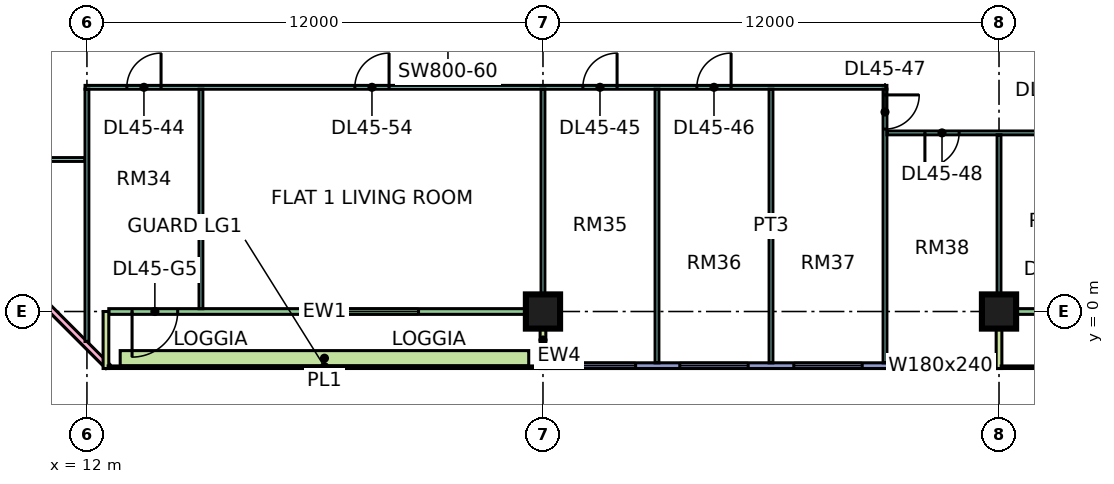
"""IFC4 building model, lengths in metres.
Left out: names, types, materials, properties, quantities, classifications, styles, units other than length and angle.
Written with IfcOpenShell. Run it as: python <this file> out.ifc"""

import sys

from ifc_helpers import new_model, si_unit, direction, frame, frame_2d, origin, origin_2d, place, context, subcontext, project, spatial, rectangle, extrude, element, fill, save


model = new_model("IFC4")
c1 = context("Model", 3, precision=1e-05, world=origin(), true_north=direction((0.0, 1.0)))
c2 = subcontext(c1, "Body", "Model", "MODEL_VIEW")
j1 = project(units=[si_unit("LENGTHUNIT", "METRE"), si_unit("PLANEANGLEUNIT", "RADIAN")], contexts=[c1])
p1 = place(None, origin())
s1 = spatial("IfcSite", under=j1, at=p1, CompositionType="ELEMENT")
p2 = place(p1, origin())
s2 = spatial("IfcBuilding", under=s1, at=p2, CompositionType="ELEMENT")
p3 = place(p2, frame((0.0, 0.0, 194.9)))
s3 = spatial("IfcBuildingStorey", under=s2, at=p3, CompositionType="ELEMENT", Elevation=194.9)
for number, where, z_axis, x_axis in (
    (1, (24.0, 0.0, 0.0), (0.0, 0.0, 1.0), (1.0, 0.0, 0.0)),
    (2, (36.0, 0.0, 0.0), (0.0, 0.0, 1.0), (1.0, 0.0, 0.0)),
):
    element("IfcColumn", number, at=place(p3, frame(where, z_axis=z_axis, x_axis=x_axis)), inside=s3, PredefinedType="COLUMN", context=c2, shape_type="SweptSolid", body=[
        extrude(rectangle(XDim=0.9, YDim=0.9, at=origin_2d()), origin(), (0.0, 0.0, 1.0), 3.75),
    ])
p4 = place(p3, frame((-1.447, 12.553, 0.0), z_axis=(0.0, 0.0, 1.0), x_axis=(0.707106781187, -0.707106781187, 0.0)))
e3 = element("IfcWall", 3, at=p4, inside=s3, PredefinedType="SOLIDWALL", context=c2, shape_type="SweptSolid", body=[
    extrude(rectangle(XDim=19.799, YDim=0.15, at=frame_2d((9.899, 0.0))), origin(), (0.0, 0.0, 1.0), 3.35),
])
p5 = place(p4, frame((2.212, 0.0, 0.45)))
e4 = element("IfcOpeningElement", 4, at=p5, cuts=e3, PredefinedType="OPENING", context=c2, shape_type="SweptSolid", body=[
    extrude(rectangle(XDim=3.0, YDim=2.4, at=frame_2d((1.5, 1.2))), frame((0.0, 0.085, 0.0), z_axis=(0.0, -1.0, 0.0), x_axis=(1.0, 0.0, 0.0)), (0.0, 0.0, 1.0), 0.17),
])
p6 = place(p4, frame((10.216, 0.0, 0.45)))
e5 = element("IfcOpeningElement", 5, at=p6, cuts=e3, PredefinedType="OPENING", context=c2, shape_type="SweptSolid", body=[
    extrude(rectangle(XDim=3.0, YDim=2.4, at=frame_2d((1.5, 1.2))), frame((0.0, 0.085, 0.0), z_axis=(0.0, -1.0, 0.0), x_axis=(1.0, 0.0, 0.0)), (0.0, 0.0, 1.0), 0.17),
])
p7 = place(p3, frame((12.575, 0.0, 0.0), z_axis=(0.0, 0.0, 1.0), x_axis=(1.0, 0.0, 0.0)))
e6 = element("IfcWall", 6, at=p7, inside=s3, PredefinedType="SOLIDWALL", context=c2, shape_type="SweptSolid", body=[
    extrude(rectangle(XDim=11.35, YDim=0.15, at=frame_2d((5.675, 0.0))), origin(), (0.0, 0.0, 1.0), 3.35),
])
p8 = place(p7, frame((0.613, 0.0, 0.0)))
e7 = element("IfcOpeningElement", 7, at=p8, cuts=e6, PredefinedType="OPENING", context=c2, shape_type="SweptSolid", body=[
    extrude(rectangle(XDim=1.2, YDim=2.4, at=frame_2d((0.6, 1.2))), frame((0.0, 0.085, 0.0), z_axis=(0.0, -1.0, 0.0), x_axis=(1.0, 0.0, 0.0)), (0.0, 0.0, 1.0), 0.17),
])
p9 = place(p7, frame((5.15, 0.0, 0.45)))
e8 = element("IfcOpeningElement", 8, at=p9, cuts=e6, PredefinedType="OPENING", context=c2, shape_type="SweptSolid", body=[
    extrude(rectangle(XDim=3.0, YDim=2.4, at=frame_2d((1.5, 1.2))), frame((0.0, 0.085, 0.0), z_axis=(0.0, -1.0, 0.0), x_axis=(1.0, 0.0, 0.0)), (0.0, 0.0, 1.0), 0.17),
])
for number, where, z_axis, x_axis in (
    (9, (12.5, -1.5, 0.0), (0.0, 0.0, 1.0), (0.0, 1.0, 0.0)),
    (10, (24.0, -1.5, 0.0), (0.0, 0.0, 1.0), (0.0, 1.0, 0.0)),
):
    element("IfcWall", number, at=place(p3, frame(where, z_axis=z_axis, x_axis=x_axis)), inside=s3, PredefinedType="SOLIDWALL", context=c2, shape_type="SweptSolid", body=[
        extrude(rectangle(XDim=1.5, YDim=0.15, at=frame_2d((0.75, 0.0))), origin(), (0.0, 0.0, 1.0), 3.35),
    ])
p10 = place(p3, frame((24.075, -1.425, 0.0), z_axis=(0.0, 0.0, 1.0), x_axis=(1.0, 0.0, 0.0)))
e11 = element("IfcWall", 11, at=p10, inside=s3, PredefinedType="SOLIDWALL", context=c2, shape_type="SweptSolid", body=[
    extrude(rectangle(XDim=11.85, YDim=0.15, at=frame_2d((5.925, 0.0))), origin(), (0.0, 0.0, 1.0), 3.35),
])
p11 = place(p10, frame((0.562, 0.0, 0.45)))
e12 = element("IfcOpeningElement", 12, at=p11, cuts=e11, PredefinedType="OPENING", context=c2, shape_type="SweptSolid", body=[
    extrude(rectangle(XDim=1.8, YDim=2.4, at=frame_2d((0.9, 1.2))), frame((0.0, 0.085, 0.0), z_axis=(0.0, -1.0, 0.0), x_axis=(1.0, 0.0, 0.0)), (0.0, 0.0, 1.0), 0.17),
])
p12 = place(p10, frame((3.525, 0.0, 0.45)))
e13 = element("IfcOpeningElement", 13, at=p12, cuts=e11, PredefinedType="OPENING", context=c2, shape_type="SweptSolid", body=[
    extrude(rectangle(XDim=1.8, YDim=2.4, at=frame_2d((0.9, 1.2))), frame((0.0, 0.085, 0.0), z_axis=(0.0, -1.0, 0.0), x_axis=(1.0, 0.0, 0.0)), (0.0, 0.0, 1.0), 0.17),
])
p13 = place(p10, frame((6.525, 0.0, 0.45)))
e14 = element("IfcOpeningElement", 14, at=p13, cuts=e11, PredefinedType="OPENING", context=c2, shape_type="SweptSolid", body=[
    extrude(rectangle(XDim=1.8, YDim=2.4, at=frame_2d((0.9, 1.2))), frame((0.0, 0.085, 0.0), z_axis=(0.0, -1.0, 0.0), x_axis=(1.0, 0.0, 0.0)), (0.0, 0.0, 1.0), 0.17),
])
p14 = place(p10, frame((9.488, 0.0, 0.45)))
e15 = element("IfcOpeningElement", 15, at=p14, cuts=e11, PredefinedType="OPENING", context=c2, shape_type="SweptSolid", body=[
    extrude(rectangle(XDim=1.8, YDim=2.4, at=frame_2d((0.9, 1.2))), frame((0.0, 0.085, 0.0), z_axis=(0.0, -1.0, 0.0), x_axis=(1.0, 0.0, 0.0)), (0.0, 0.0, 1.0), 0.17),
])
p15 = place(p3, frame((36.075, 0.0, 0.0), z_axis=(0.0, 0.0, 1.0), x_axis=(1.0, 0.0, 0.0)))
e16 = element("IfcWall", 16, at=p15, inside=s3, PredefinedType="SOLIDWALL", context=c2, shape_type="SweptSolid", body=[
    extrude(rectangle(XDim=11.85, YDim=0.15, at=frame_2d((5.925, 0.0))), origin(), (0.0, 0.0, 1.0), 3.35),
])
p16 = place(p15, frame((1.1, 0.0, 0.0)))
e17 = element("IfcOpeningElement", 17, at=p16, cuts=e16, PredefinedType="OPENING", context=c2, shape_type="SweptSolid", body=[
    extrude(rectangle(XDim=1.2, YDim=2.4, at=frame_2d((0.6, 1.2))), frame((0.0, 0.085, 0.0), z_axis=(0.0, -1.0, 0.0), x_axis=(1.0, 0.0, 0.0)), (0.0, 0.0, 1.0), 0.17),
])
p17 = place(p15, frame((4.15, 0.0, 0.45)))
e18 = element("IfcOpeningElement", 18, at=p17, cuts=e16, PredefinedType="OPENING", context=c2, shape_type="SweptSolid", body=[
    extrude(rectangle(XDim=3.0, YDim=2.4, at=frame_2d((1.5, 1.2))), frame((0.0, 0.085, 0.0), z_axis=(0.0, -1.0, 0.0), x_axis=(1.0, 0.0, 0.0)), (0.0, 0.0, 1.0), 0.17),
])
p18 = place(p15, frame((10.062, 0.0, 0.45)))
e19 = element("IfcOpeningElement", 19, at=p18, cuts=e16, PredefinedType="OPENING", context=c2, shape_type="SweptSolid", body=[
    extrude(rectangle(XDim=1.2, YDim=2.4, at=frame_2d((0.6, 1.2))), frame((0.0, 0.085, 0.0), z_axis=(0.0, -1.0, 0.0), x_axis=(1.0, 0.0, 0.0)), (0.0, 0.0, 1.0), 0.17),
])
p19 = place(p3, frame((36.0, -1.5, 0.0), z_axis=(0.0, 0.0, 1.0), x_axis=(0.0, 1.0, 0.0)))
e20 = element("IfcWall", 20, at=p19, inside=s3, PredefinedType="SOLIDWALL", context=c2, shape_type="SweptSolid", body=[
    extrude(rectangle(XDim=1.5, YDim=0.15, at=frame_2d((0.75, 0.0))), origin(), (0.0, 0.0, 1.0), 3.35),
])
p20 = place(p3, frame((12.875, -1.229, 0.0), z_axis=(0.0, 0.0, 1.0), x_axis=(1.0, 0.0, 0.0)))
e21 = element("IfcWall", 21, at=p20, inside=s3, PredefinedType="SOLIDWALL", context=c2, shape_type="SweptSolid", body=[
    extrude(rectangle(XDim=10.75, YDim=0.4, at=frame_2d((5.375, 0.0))), origin(), (0.0, 0.0, 1.0), 0.7),
])
p21 = place(p3, frame((9.05, 4.0, 0.0), z_axis=(0.0, 0.0, 1.0), x_axis=(1.0, 0.0, 0.0)))
e22 = element("IfcWall", 22, at=p21, inside=s3, PredefinedType="PARTITIONING", context=c2, shape_type="SweptSolid", body=[
    extrude(rectangle(XDim=2.9, YDim=0.1, at=frame_2d((1.45, 0.0))), origin(), (0.0, 0.0, 1.0), 3.35),
])
p22 = place(p3, frame((11.95, 5.9, 0.0), z_axis=(0.0, 0.0, 1.0), x_axis=(1.0, 0.0, 0.0)))
e23 = element("IfcWall", 23, at=p22, inside=s3, PredefinedType="PARTITIONING", context=c2, shape_type="SweptSolid", body=[
    extrude(rectangle(XDim=21.1, YDim=0.1, at=frame_2d((10.55, 0.0))), origin(), (0.0, 0.0, 1.0), 3.35),
])
p23 = place(p22, frame((1.1, 0.0, 0.0)))
e24 = element("IfcOpeningElement", 24, at=p23, cuts=e23, PredefinedType="OPENING", context=c2, shape_type="SweptSolid", body=[
    extrude(rectangle(XDim=0.9, YDim=2.1, at=frame_2d((0.45, 1.05))), frame((0.0, 0.06, 0.0), z_axis=(0.0, -1.0, 0.0), x_axis=(1.0, 0.0, 0.0)), (0.0, 0.0, 1.0), 0.12),
])
p24 = place(p22, frame((13.1, 0.0, 0.0)))
e25 = element("IfcOpeningElement", 25, at=p24, cuts=e23, PredefinedType="OPENING", context=c2, shape_type="SweptSolid", body=[
    extrude(rectangle(XDim=0.9, YDim=2.1, at=frame_2d((0.45, 1.05))), frame((0.0, 0.06, 0.0), z_axis=(0.0, -1.0, 0.0), x_axis=(1.0, 0.0, 0.0)), (0.0, 0.0, 1.0), 0.12),
])
p25 = place(p22, frame((16.1, 0.0, 0.0)))
e26 = element("IfcOpeningElement", 26, at=p25, cuts=e23, PredefinedType="OPENING", context=c2, shape_type="SweptSolid", body=[
    extrude(rectangle(XDim=0.9, YDim=2.1, at=frame_2d((0.45, 1.05))), frame((0.0, 0.06, 0.0), z_axis=(0.0, -1.0, 0.0), x_axis=(1.0, 0.0, 0.0)), (0.0, 0.0, 1.0), 0.12),
])
p26 = place(p22, frame((7.1, 0.0, 0.0)))
e27 = element("IfcOpeningElement", 27, at=p26, cuts=e23, PredefinedType="OPENING", context=c2, shape_type="SweptSolid", body=[
    extrude(rectangle(XDim=0.9, YDim=2.1, at=frame_2d((0.45, 1.05))), frame((0.0, 0.06, 0.0), z_axis=(0.0, -1.0, 0.0), x_axis=(1.0, 0.0, 0.0)), (0.0, 0.0, 1.0), 0.12),
])
p27 = place(p3, frame((12.0, -0.788, 0.0), z_axis=(0.0, 0.0, 1.0), x_axis=(0.0, 1.0, 0.0)))
e28 = element("IfcWall", 28, at=p27, inside=s3, PredefinedType="PARTITIONING", context=c2, shape_type="SweptSolid", body=[
    extrude(rectangle(XDim=6.638, YDim=0.1, at=frame_2d((3.319, 0.0))), origin(), (0.0, 0.0, 1.0), 3.35),
])
p28 = place(p3, frame((15.0, 0.074, 0.0), z_axis=(0.0, 0.0, 1.0), x_axis=(0.0, 1.0, 0.0)))
e29 = element("IfcWall", 29, at=p28, inside=s3, PredefinedType="PARTITIONING", context=c2, shape_type="SweptSolid", body=[
    extrude(rectangle(XDim=5.776, YDim=0.1, at=frame_2d((2.888, 0.0))), origin(), (0.0, 0.0, 1.0), 3.35),
])
p29 = place(p3, frame((24.0, 0.0, 0.0), z_axis=(0.0, 0.0, 1.0), x_axis=(0.0, 1.0, 0.0)))
e30 = element("IfcWall", 30, at=p29, inside=s3, PredefinedType="PARTITIONING", context=c2, shape_type="SweptSolid", body=[
    extrude(rectangle(XDim=5.85, YDim=0.1, at=frame_2d((2.925, 0.0))), origin(), (0.0, 0.0, 1.0), 3.35),
])
for number, where, z_axis, x_axis in (
    (31, (27.0, -1.351, 0.0), (0.0, 0.0, 1.0), (0.0, 1.0, 0.0)),
    (32, (30.0, -1.351, 0.0), (0.0, 0.0, 1.0), (0.0, 1.0, 0.0)),
):
    element("IfcWall", number, at=place(p3, frame(where, z_axis=z_axis, x_axis=x_axis)), inside=s3, PredefinedType="PARTITIONING", context=c2, shape_type="SweptSolid", body=[
        extrude(rectangle(XDim=7.201, YDim=0.1, at=frame_2d((3.601, 0.0))), origin(), (0.0, 0.0, 1.0), 3.35),
    ])
p30 = place(p3, frame((33.0, -1.351, 0.0), z_axis=(0.0, 0.0, 1.0), x_axis=(0.0, 1.0, 0.0)))
e33 = element("IfcWall", 33, at=p30, inside=s3, PredefinedType="PARTITIONING", context=c2, shape_type="SweptSolid", body=[
    extrude(rectangle(XDim=7.201, YDim=0.1, at=frame_2d((3.601, 0.0))), origin(), (0.0, 0.0, 1.0), 3.35),
])
p31 = place(p30, frame((6.151, 0.0, 0.0)))
e34 = element("IfcOpeningElement", 34, at=p31, cuts=e33, PredefinedType="OPENING", context=c2, shape_type="SweptSolid", body=[
    extrude(rectangle(XDim=0.9, YDim=2.1, at=frame_2d((0.45, 1.05))), frame((0.0, 0.06, 0.0), z_axis=(0.0, -1.0, 0.0), x_axis=(1.0, 0.0, 0.0)), (0.0, 0.0, 1.0), 0.12),
])
p32 = place(p3, frame((33.05, 4.7, 0.0), z_axis=(0.0, 0.0, 1.0), x_axis=(1.0, 0.0, 0.0)))
e35 = element("IfcWall", 35, at=p32, inside=s3, PredefinedType="PARTITIONING", context=c2, shape_type="SweptSolid", body=[
    extrude(rectangle(XDim=14.85, YDim=0.1, at=frame_2d((7.425, 0.0))), origin(), (0.0, 0.0, 1.0), 3.35),
])
p33 = place(p32, frame((1.0, 0.0, 0.0)))
e36 = element("IfcOpeningElement", 36, at=p33, cuts=e35, PredefinedType="OPENING", context=c2, shape_type="SweptSolid", body=[
    extrude(rectangle(XDim=0.9, YDim=2.1, at=frame_2d((0.45, 1.05))), frame((0.0, 0.06, 0.0), z_axis=(0.0, -1.0, 0.0), x_axis=(1.0, 0.0, 0.0)), (0.0, 0.0, 1.0), 0.12),
])
p34 = place(p32, frame((4.0, 0.0, 0.0)))
e37 = element("IfcOpeningElement", 37, at=p34, cuts=e35, PredefinedType="OPENING", context=c2, shape_type="SweptSolid", body=[
    extrude(rectangle(XDim=0.9, YDim=2.1, at=frame_2d((0.45, 1.05))), frame((0.0, 0.06, 0.0), z_axis=(0.0, -1.0, 0.0), x_axis=(1.0, 0.0, 0.0)), (0.0, 0.0, 1.0), 0.12),
])
p35 = place(p32, frame((10.0, 0.0, 0.0)))
e38 = element("IfcOpeningElement", 38, at=p35, cuts=e35, PredefinedType="OPENING", context=c2, shape_type="SweptSolid", body=[
    extrude(rectangle(XDim=0.9, YDim=2.1, at=frame_2d((0.45, 1.05))), frame((0.0, 0.06, 0.0), z_axis=(0.0, -1.0, 0.0), x_axis=(1.0, 0.0, 0.0)), (0.0, 0.0, 1.0), 0.12),
])
p36 = place(p3, frame((36.0, 0.0, 0.0), z_axis=(0.0, 0.0, 1.0), x_axis=(0.0, 1.0, 0.0)))
e39 = element("IfcWall", 39, at=p36, inside=s3, PredefinedType="PARTITIONING", context=c2, shape_type="SweptSolid", body=[
    extrude(rectangle(XDim=4.65, YDim=0.1, at=frame_2d((2.325, 0.0))), origin(), (0.0, 0.0, 1.0), 3.35),
])
p37 = place(p8, frame((1.2, 0.0, 0.0), z_axis=(0.0, 0.0, 1.0), x_axis=(-1.0, 0.0, 0.0)))
e40 = element("IfcDoor", 40, at=p37, inside=s3, OperationType="DOUBLE_DOOR_SINGLE_SWING", PredefinedType="DOOR", context=c2, shape_type="SweptSolid", body=[
    extrude(rectangle(XDim=1.2, YDim=2.4, at=frame_2d((0.6, 1.2))), frame((0.0, 0.025, 0.0), z_axis=(0.0, -1.0, 0.0), x_axis=(1.0, 0.0, 0.0)), (0.0, 0.0, 1.0), 0.05),
])
fill(e7, e40)
p38 = place(p9, origin())
e41 = element("IfcWindow", 41, at=p38, inside=s3, PartitioningType="SINGLE_PANEL", PredefinedType="WINDOW", context=c2, shape_type="SweptSolid", body=[
    extrude(rectangle(XDim=3.0, YDim=2.4, at=frame_2d((1.5, 1.2))), frame((0.0, 0.03, 0.0), z_axis=(0.0, -1.0, 0.0), x_axis=(1.0, 0.0, 0.0)), (0.0, 0.0, 1.0), 0.06),
])
fill(e8, e41)
p39 = place(p11, origin())
e42 = element("IfcWindow", 42, at=p39, inside=s3, PartitioningType="SINGLE_PANEL", PredefinedType="WINDOW", context=c2, shape_type="SweptSolid", body=[
    extrude(rectangle(XDim=1.8, YDim=2.4, at=frame_2d((0.9, 1.2))), frame((0.0, 0.03, 0.0), z_axis=(0.0, -1.0, 0.0), x_axis=(1.0, 0.0, 0.0)), (0.0, 0.0, 1.0), 0.06),
])
fill(e12, e42)
p40 = place(p12, origin())
e43 = element("IfcWindow", 43, at=p40, inside=s3, PartitioningType="SINGLE_PANEL", PredefinedType="WINDOW", context=c2, shape_type="SweptSolid", body=[
    extrude(rectangle(XDim=1.8, YDim=2.4, at=frame_2d((0.9, 1.2))), frame((0.0, 0.03, 0.0), z_axis=(0.0, -1.0, 0.0), x_axis=(1.0, 0.0, 0.0)), (0.0, 0.0, 1.0), 0.06),
])
fill(e13, e43)
p41 = place(p13, origin())
e44 = element("IfcWindow", 44, at=p41, inside=s3, PartitioningType="SINGLE_PANEL", PredefinedType="WINDOW", context=c2, shape_type="SweptSolid", body=[
    extrude(rectangle(XDim=1.8, YDim=2.4, at=frame_2d((0.9, 1.2))), frame((0.0, 0.03, 0.0), z_axis=(0.0, -1.0, 0.0), x_axis=(1.0, 0.0, 0.0)), (0.0, 0.0, 1.0), 0.06),
])
fill(e14, e44)
p42 = place(p14, origin())
e45 = element("IfcWindow", 45, at=p42, inside=s3, PartitioningType="SINGLE_PANEL", PredefinedType="WINDOW", context=c2, shape_type="SweptSolid", body=[
    extrude(rectangle(XDim=1.8, YDim=2.4, at=frame_2d((0.9, 1.2))), frame((0.0, 0.03, 0.0), z_axis=(0.0, -1.0, 0.0), x_axis=(1.0, 0.0, 0.0)), (0.0, 0.0, 1.0), 0.06),
])
fill(e15, e45)
p43 = place(p23, frame((0.9, 0.0, 0.0), z_axis=(0.0, 0.0, 1.0), x_axis=(-1.0, 0.0, 0.0)))
e46 = element("IfcDoor", 46, at=p43, inside=s3, OperationType="SINGLE_SWING_RIGHT", PredefinedType="DOOR", context=c2, shape_type="SweptSolid", body=[
    extrude(rectangle(XDim=0.9, YDim=2.1, at=frame_2d((0.45, 1.05))), frame((0.0, 0.025, 0.0), z_axis=(0.0, -1.0, 0.0), x_axis=(1.0, 0.0, 0.0)), (0.0, 0.0, 1.0), 0.05),
])
fill(e24, e46)
p44 = place(p24, frame((0.9, 0.0, 0.0), z_axis=(0.0, 0.0, 1.0), x_axis=(-1.0, 0.0, 0.0)))
e47 = element("IfcDoor", 47, at=p44, inside=s3, OperationType="SINGLE_SWING_RIGHT", PredefinedType="DOOR", context=c2, shape_type="SweptSolid", body=[
    extrude(rectangle(XDim=0.9, YDim=2.1, at=frame_2d((0.45, 1.05))), frame((0.0, 0.025, 0.0), z_axis=(0.0, -1.0, 0.0), x_axis=(1.0, 0.0, 0.0)), (0.0, 0.0, 1.0), 0.05),
])
fill(e25, e47)
p45 = place(p25, frame((0.9, 0.0, 0.0), z_axis=(0.0, 0.0, 1.0), x_axis=(-1.0, 0.0, 0.0)))
e48 = element("IfcDoor", 48, at=p45, inside=s3, OperationType="SINGLE_SWING_RIGHT", PredefinedType="DOOR", context=c2, shape_type="SweptSolid", body=[
    extrude(rectangle(XDim=0.9, YDim=2.1, at=frame_2d((0.45, 1.05))), frame((0.0, 0.025, 0.0), z_axis=(0.0, -1.0, 0.0), x_axis=(1.0, 0.0, 0.0)), (0.0, 0.0, 1.0), 0.05),
])
fill(e26, e48)
p46 = place(p31, origin())
e49 = element("IfcDoor", 49, at=p46, inside=s3, OperationType="SINGLE_SWING_RIGHT", PredefinedType="DOOR", context=c2, shape_type="SweptSolid", body=[
    extrude(rectangle(XDim=0.9, YDim=2.1, at=frame_2d((0.45, 1.05))), frame((0.0, 0.025, 0.0), z_axis=(0.0, -1.0, 0.0), x_axis=(1.0, 0.0, 0.0)), (0.0, 0.0, 1.0), 0.05),
])
fill(e34, e49)
p47 = place(p33, frame((0.9, 0.0, 0.0), z_axis=(0.0, 0.0, 1.0), x_axis=(-1.0, 0.0, 0.0)))
e50 = element("IfcDoor", 50, at=p47, inside=s3, OperationType="SINGLE_SWING_LEFT", PredefinedType="DOOR", context=c2, shape_type="SweptSolid", body=[
    extrude(rectangle(XDim=0.9, YDim=2.1, at=frame_2d((0.45, 1.05))), frame((0.0, 0.025, 0.0), z_axis=(0.0, -1.0, 0.0), x_axis=(1.0, 0.0, 0.0)), (0.0, 0.0, 1.0), 0.05),
])
fill(e36, e50)
p48 = place(p26, frame((0.9, 0.0, 0.0), z_axis=(0.0, 0.0, 1.0), x_axis=(-1.0, 0.0, 0.0)))
e51 = element("IfcDoor", 51, at=p48, inside=s3, OperationType="SINGLE_SWING_RIGHT", PredefinedType="DOOR", context=c2, shape_type="SweptSolid", body=[
    extrude(rectangle(XDim=0.9, YDim=2.1, at=frame_2d((0.45, 1.05))), frame((0.0, 0.025, 0.0), z_axis=(0.0, -1.0, 0.0), x_axis=(1.0, 0.0, 0.0)), (0.0, 0.0, 1.0), 0.05),
])
fill(e27, e51)
save(model, sys.argv[1])
